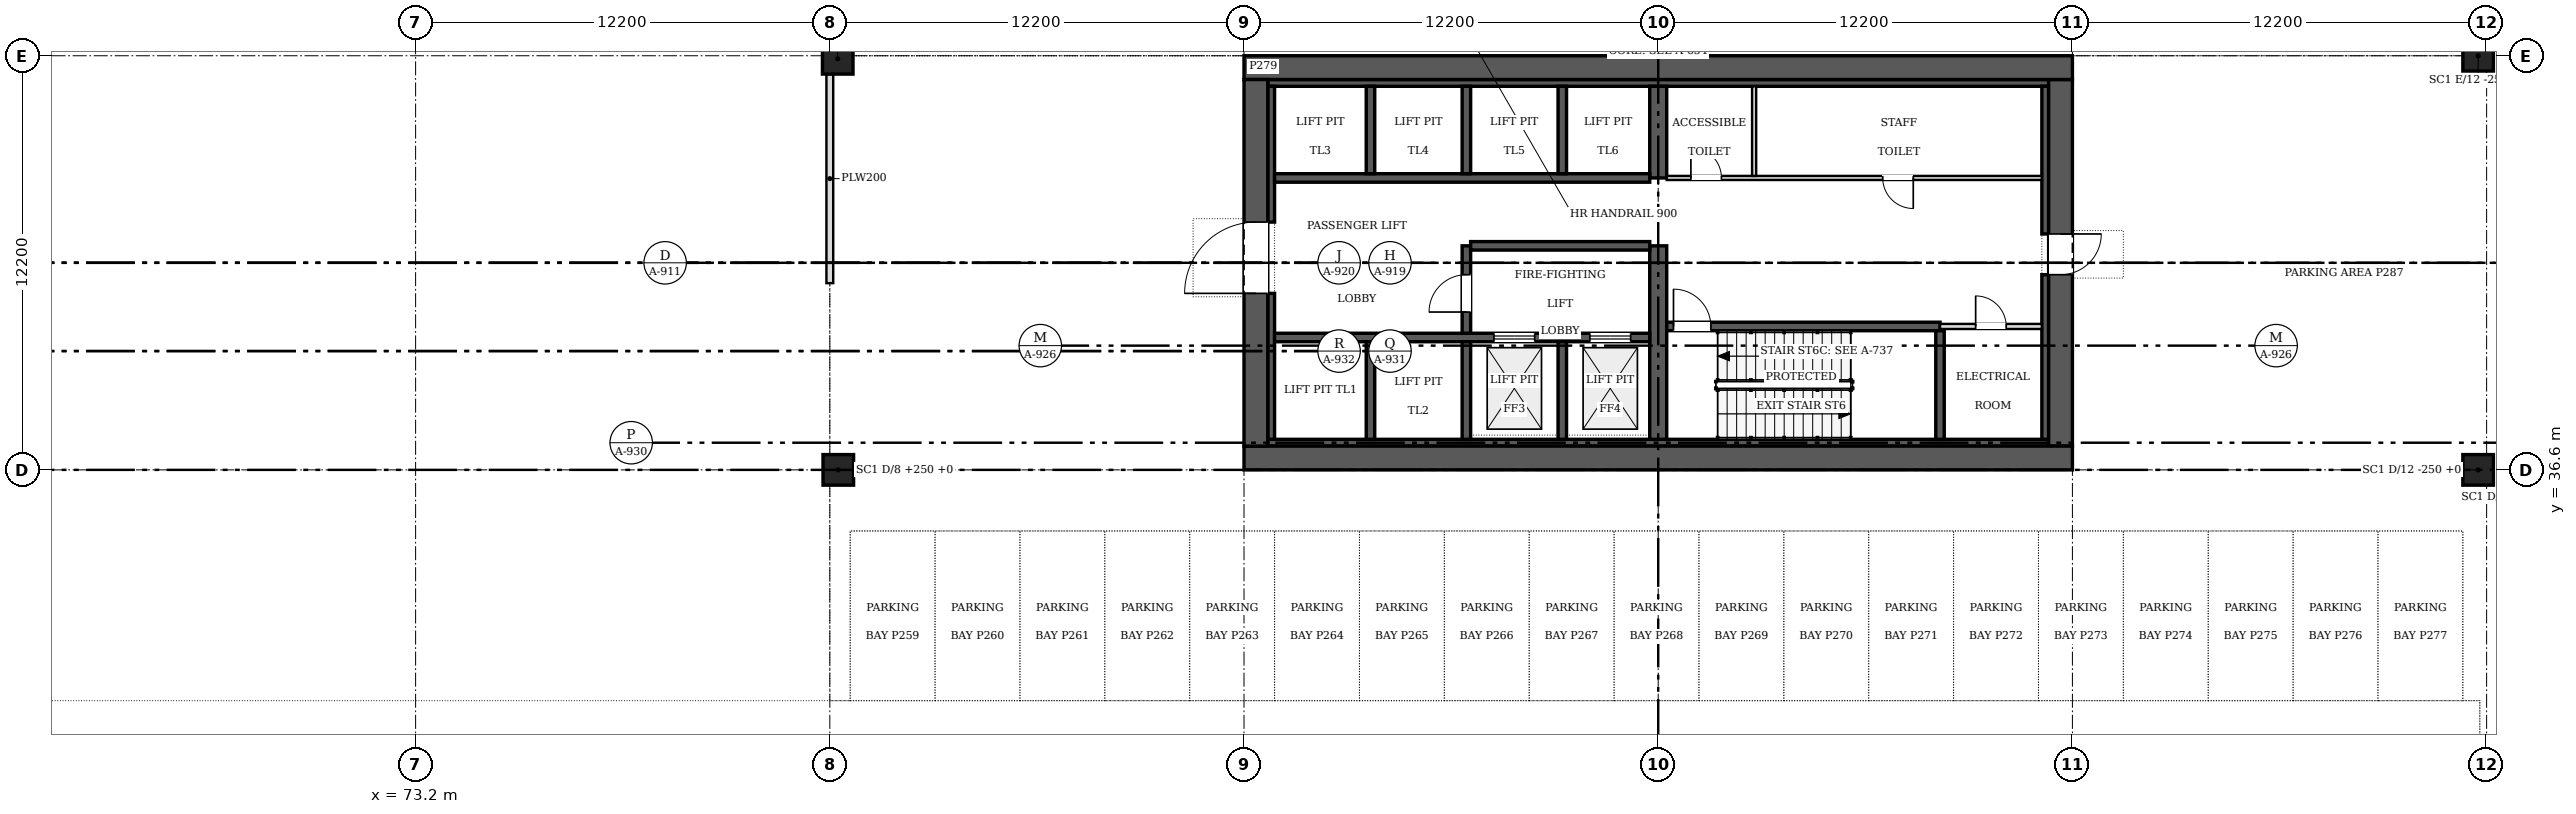
"""IFC4 building model, lengths in metres.
Left out: names, types, materials, properties, quantities, classifications, styles, units other than length and angle.
Written with IfcOpenShell. Run it as: python <this file> out.ifc"""

import sys

from ifc_helpers import new_model, si_unit, direction, frame, frame_2d, origin, origin_2d, place, context, subcontext, project, spatial, rectangle, extrude, source, transform, mapped, element, fill, save


model = new_model("IFC4")
c1 = context("Model", 3, precision=1e-05, world=origin(), true_north=direction((0.0, 1.0)))
c2 = subcontext(c1, "Body", "Model", "MODEL_VIEW")
j1 = project(units=[si_unit("LENGTHUNIT", "METRE"), si_unit("PLANEANGLEUNIT", "RADIAN")], contexts=[c1])
p1 = place(None, origin())
s1 = spatial("IfcSite", under=j1, at=p1, CompositionType="ELEMENT")
p2 = place(p1, origin())
s2 = spatial("IfcBuilding", under=s1, at=p2, CompositionType="ELEMENT")
p3 = place(p2, frame((0.0, 0.0, -5.4)))
s3 = spatial("IfcBuildingStorey", under=s2, at=p3, CompositionType="ELEMENT", Elevation=-5.4)
for number, where, z_axis, x_axis in (
    (1, (133.95, 36.6, 0.0), (0.0, 0.0, 1.0), (1.0, 0.0, 0.0)),
    (2, (133.95, 48.8, 0.0), (0.0, 0.0, 1.0), (1.0, 0.0, 0.0)),
    (3, (85.633, 48.71, 0.0), (0.0, 0.0, 1.0), (1.0, 0.0, 0.0)),
    (4, (85.65, 36.6, 0.0), (0.0, 0.0, 1.0), (1.0, 0.0, 0.0)),
    (5, (73.2, 36.6, 0.0), (0.0, 0.0, 1.0), (1.0, 0.0, 0.0)),
    (6, (73.2, 48.8, 0.0), (0.0, 0.0, 1.0), (1.0, 0.0, 0.0)),
):
    element("IfcColumn", number, at=place(p3, frame(where, z_axis=z_axis, x_axis=x_axis)), inside=s3, PredefinedType="COLUMN", context=c2, shape_type="SweptSolid", body=[
        extrude(rectangle(XDim=0.9, YDim=0.9, at=origin_2d()), origin(), (0.0, 0.0, 1.0), 5.15),
    ])
p4 = place(p3, frame((122.0, 36.95, 0.0), z_axis=(0.0, 0.0, 1.0), x_axis=(-1.0, 0.0, 0.0)))
e7 = element("IfcWall", 7, at=p4, inside=s3, PredefinedType="SHEAR", context=c2, shape_type="SweptSolid", body=[
    extrude(rectangle(XDim=24.4, YDim=0.7, at=frame_2d((12.2, 0.0))), origin(), (0.0, 0.0, 1.0), 5.4),
])
p5 = place(p3, frame((97.95, 37.3, 0.0), z_axis=(0.0, 0.0, 1.0), x_axis=(0.0, 1.0, 0.0)))
e8 = element("IfcWall", 8, at=p5, inside=s3, PredefinedType="SHEAR", context=c2, shape_type="SweptSolid", body=[
    extrude(rectangle(XDim=10.8, YDim=0.7, at=frame_2d((5.4, 0.0))), origin(), (0.0, 0.0, 1.0), 5.4),
])
m1 = source(origin(), c2, "Body", "SweptSolid", [
    extrude(rectangle(XDim=2.1, YDim=2.4, at=frame_2d((1.05, 1.2))), frame((0.0, 0.36, 0.0), z_axis=(0.0, -1.0, 0.0), x_axis=(1.0, 0.0, 0.0)), (0.0, 0.0, 1.0), 0.72),
])
p6 = place(p5, frame((4.5, 0.0, 0.0)))
e9 = element("IfcOpeningElement", 9, at=p6, cuts=e8, PredefinedType="OPENING", context=c2, shape_type="MappedRepresentation", body=[
    mapped(m1, transform((0.0, 0.0, 0.0), scale=1.0)),
])
p7 = place(p3, frame((97.6, 48.45, 0.0), z_axis=(0.0, 0.0, 1.0), x_axis=(1.0, 0.0, 0.0)))
e10 = element("IfcWall", 10, at=p7, inside=s3, PredefinedType="SHEAR", context=c2, shape_type="SweptSolid", body=[
    extrude(rectangle(XDim=24.4, YDim=0.7, at=frame_2d((12.2, 0.0))), origin(), (0.0, 0.0, 1.0), 5.4),
])
p8 = place(p3, frame((121.65, 48.1, 0.0), z_axis=(0.0, 0.0, 1.0), x_axis=(0.0, -1.0, 0.0)))
e11 = element("IfcWall", 11, at=p8, inside=s3, PredefinedType="SHEAR", context=c2, shape_type="SweptSolid", body=[
    extrude(rectangle(XDim=10.8, YDim=0.7, at=frame_2d((5.4, 0.0))), origin(), (0.0, 0.0, 1.0), 5.4),
])
m2 = source(origin(), c2, "Body", "SweptSolid", [
    extrude(rectangle(XDim=1.2, YDim=2.1, at=frame_2d((0.6, 1.05))), frame((0.0, 0.36, 0.0), z_axis=(0.0, -1.0, 0.0), x_axis=(1.0, 0.0, 0.0)), (0.0, 0.0, 1.0), 0.72),
])
p9 = place(p8, frame((4.55, 0.0, 0.0)))
e12 = element("IfcOpeningElement", 12, at=p9, cuts=e11, PredefinedType="OPENING", context=c2, shape_type="MappedRepresentation", body=[
    mapped(m2, transform((0.0, 0.0, 0.0), scale=1.0)),
])
for number, where, z_axis, x_axis in (
    (13, (98.3, 37.4, 0.0), (0.0, 0.0, 1.0), (1.0, 0.0, 0.0)),
    (14, (98.3, 48.0, 0.0), (0.0, 0.0, 1.0), (1.0, 0.0, 0.0)),
):
    element("IfcWall", number, at=place(p3, frame(where, z_axis=z_axis, x_axis=x_axis)), inside=s3, PredefinedType="SOLIDWALL", context=c2, shape_type="SweptSolid", body=[
        extrude(rectangle(XDim=23.0, YDim=0.2, at=frame_2d((11.5, 0.0))), origin(), (0.0, 0.0, 1.0), 5.4),
    ])
p10 = place(p3, frame((98.4, 37.5, 0.0), z_axis=(0.0, 0.0, 1.0), x_axis=(0.0, 1.0, 0.0)))
e15 = element("IfcWall", 15, at=p10, inside=s3, PredefinedType="SOLIDWALL", context=c2, shape_type="SweptSolid", body=[
    extrude(rectangle(XDim=4.3, YDim=0.2, at=frame_2d((2.15, 0.0))), origin(), (0.0, 0.0, 1.0), 5.4),
])
p11 = place(p3, frame((98.4, 43.9, 0.0), z_axis=(0.0, 0.0, 1.0), x_axis=(0.0, 1.0, 0.0)))
e16 = element("IfcWall", 16, at=p11, inside=s3, PredefinedType="SOLIDWALL", context=c2, shape_type="SweptSolid", body=[
    extrude(rectangle(XDim=4.0, YDim=0.2, at=frame_2d((2.0, 0.0))), origin(), (0.0, 0.0, 1.0), 5.4),
])
p12 = place(p3, frame((121.2, 37.5, 0.0), z_axis=(0.0, 0.0, 1.0), x_axis=(0.0, 1.0, 0.0)))
e17 = element("IfcWall", 17, at=p12, inside=s3, PredefinedType="SOLIDWALL", context=c2, shape_type="SweptSolid", body=[
    extrude(rectangle(XDim=4.85, YDim=0.2, at=frame_2d((2.425, 0.0))), origin(), (0.0, 0.0, 1.0), 5.4),
])
p13 = place(p3, frame((121.2, 43.55, 0.0), z_axis=(0.0, 0.0, 1.0), x_axis=(0.0, 1.0, 0.0)))
e18 = element("IfcWall", 18, at=p13, inside=s3, PredefinedType="SOLIDWALL", context=c2, shape_type="SweptSolid", body=[
    extrude(rectangle(XDim=4.35, YDim=0.2, at=frame_2d((2.175, 0.0))), origin(), (0.0, 0.0, 1.0), 5.4),
])
p14 = place(p3, frame((109.8, 37.5, 0.0), z_axis=(0.0, 0.0, 1.0), x_axis=(0.0, 1.0, 0.0)))
e19 = element("IfcWall", 19, at=p14, inside=s3, PredefinedType="SHEAR", context=c2, shape_type="SweptSolid", body=[
    extrude(rectangle(XDim=5.7, YDim=0.5, at=frame_2d((2.85, 0.0))), origin(), (0.0, 0.0, 1.0), 5.4),
])
p15 = place(p3, frame((109.8, 45.2, 0.0), z_axis=(0.0, 0.0, 1.0), x_axis=(0.0, 1.0, 0.0)))
e20 = element("IfcWall", 20, at=p15, inside=s3, PredefinedType="SHEAR", context=c2, shape_type="SweptSolid", body=[
    extrude(rectangle(XDim=2.7, YDim=0.5, at=frame_2d((1.35, 0.0))), origin(), (0.0, 0.0, 1.0), 5.4),
])
p16 = place(p3, frame((98.5, 40.5, 0.0), z_axis=(0.0, 0.0, 1.0), x_axis=(1.0, 0.0, 0.0)))
e21 = element("IfcWall", 21, at=p16, inside=s3, PredefinedType="SOLIDWALL", context=c2, shape_type="SweptSolid", body=[
    extrude(rectangle(XDim=11.05, YDim=0.25, at=frame_2d((5.525, 0.0))), origin(), (0.0, 0.0, 1.0), 5.4),
])
m3 = source(origin(), c2, "Body", "SweptSolid", [
    extrude(rectangle(XDim=1.2, YDim=2.1, at=frame_2d((0.6, 1.05))), frame((0.0, 0.135, 0.0), z_axis=(0.0, -1.0, 0.0), x_axis=(1.0, 0.0, 0.0)), (0.0, 0.0, 1.0), 0.27),
])
p17 = place(p16, frame((6.462, 0.0, 0.0)))
e22 = element("IfcOpeningElement", 22, at=p17, cuts=e21, PredefinedType="OPENING", context=c2, shape_type="MappedRepresentation", body=[
    mapped(m3, transform((0.0, 0.0, 0.0), scale=1.0)),
])
p18 = place(p16, frame((9.288, 0.0, 0.0)))
e23 = element("IfcOpeningElement", 23, at=p18, cuts=e21, PredefinedType="OPENING", context=c2, shape_type="MappedRepresentation", body=[
    mapped(m3, transform((0.0, 0.0, 0.0), scale=1.0)),
])
p19 = place(p3, frame((98.5, 45.2, 0.0), z_axis=(0.0, 0.0, 1.0), x_axis=(1.0, 0.0, 0.0)))
e24 = element("IfcWall", 24, at=p19, inside=s3, PredefinedType="SOLIDWALL", context=c2, shape_type="SweptSolid", body=[
    extrude(rectangle(XDim=11.05, YDim=0.25, at=frame_2d((5.525, 0.0))), origin(), (0.0, 0.0, 1.0), 5.4),
])
p20 = place(p3, frame((118.1, 40.825, 0.0), z_axis=(0.0, 0.0, 1.0), x_axis=(-1.0, 0.0, 0.0)))
e25 = element("IfcWall", 25, at=p20, inside=s3, PredefinedType="SOLIDWALL", context=c2, shape_type="SweptSolid", body=[
    extrude(rectangle(XDim=8.05, YDim=0.25, at=frame_2d((4.025, 0.0))), origin(), (0.0, 0.0, 1.0), 5.4),
])
m4 = source(origin(), c2, "Body", "SweptSolid", [
    extrude(rectangle(XDim=1.1, YDim=2.1, at=frame_2d((0.55, 1.05))), frame((0.0, 0.135, 0.0), z_axis=(0.0, -1.0, 0.0), x_axis=(1.0, 0.0, 0.0)), (0.0, 0.0, 1.0), 0.27),
])
p21 = place(p20, frame((6.75, 0.0, 0.0)))
e26 = element("IfcOpeningElement", 26, at=p21, cuts=e25, PredefinedType="OPENING", context=c2, shape_type="MappedRepresentation", body=[
    mapped(m4, transform((0.0, 0.0, 0.0), scale=1.0)),
])
p22 = place(p3, frame((104.15, 37.5, 0.0), z_axis=(0.0, 0.0, 1.0), x_axis=(0.0, 1.0, 0.0)))
e27 = element("IfcWall", 27, at=p22, inside=s3, PredefinedType="SOLIDWALL", context=c2, shape_type="SweptSolid", body=[
    extrude(rectangle(XDim=2.875, YDim=0.25, at=frame_2d((1.438, 0.0))), origin(), (0.0, 0.0, 1.0), 5.4),
])
p23 = place(p3, frame((104.15, 43.2, 0.0), z_axis=(0.0, 0.0, 1.0), x_axis=(0.0, -1.0, 0.0)))
e28 = element("IfcWall", 28, at=p23, inside=s3, PredefinedType="SOLIDWALL", context=c2, shape_type="SweptSolid", body=[
    extrude(rectangle(XDim=2.575, YDim=0.25, at=frame_2d((1.288, 0.0))), origin(), (0.0, 0.0, 1.0), 5.4),
])
p24 = place(p23, frame((0.85, 0.0, 0.0)))
e29 = element("IfcOpeningElement", 29, at=p24, cuts=e28, PredefinedType="OPENING", context=c2, shape_type="MappedRepresentation", body=[
    mapped(m4, transform((0.0, 0.0, 0.0), scale=1.0)),
])
p25 = place(p3, frame((104.275, 43.2, 0.0), z_axis=(0.0, 0.0, 1.0), x_axis=(1.0, 0.0, 0.0)))
e30 = element("IfcWall", 30, at=p25, inside=s3, PredefinedType="SOLIDWALL", context=c2, shape_type="SweptSolid", body=[
    extrude(rectangle(XDim=5.275, YDim=0.25, at=frame_2d((2.638, 0.0))), origin(), (0.0, 0.0, 1.0), 5.4),
])
p26 = place(p3, frame((118.1, 37.5, 0.0), z_axis=(0.0, 0.0, 1.0), x_axis=(0.0, 1.0, 0.0)))
e31 = element("IfcWall", 31, at=p26, inside=s3, PredefinedType="SOLIDWALL", context=c2, shape_type="SweptSolid", body=[
    extrude(rectangle(XDim=3.2, YDim=0.25, at=frame_2d((1.6, 0.0))), origin(), (0.0, 0.0, 1.0), 5.4),
])
for number, where, z_axis, x_axis in (
    (32, (101.325, 37.5, 0.0), (0.0, 0.0, 1.0), (0.0, 1.0, 0.0)),
    (33, (106.975, 37.5, 0.0), (0.0, 0.0, 1.0), (0.0, 1.0, 0.0)),
):
    element("IfcWall", number, at=place(p3, frame(where, z_axis=z_axis, x_axis=x_axis)), inside=s3, PredefinedType="SOLIDWALL", context=c2, shape_type="SweptSolid", body=[
        extrude(rectangle(XDim=2.875, YDim=0.25, at=frame_2d((1.438, 0.0))), origin(), (0.0, 0.0, 1.0), 5.4),
    ])
for number, where, z_axis, x_axis in (
    (34, (101.325, 45.325, 0.0), (0.0, 0.0, 1.0), (0.0, 1.0, 0.0)),
    (35, (104.15, 45.325, 0.0), (0.0, 0.0, 1.0), (0.0, 1.0, 0.0)),
    (36, (106.975, 45.325, 0.0), (0.0, 0.0, 1.0), (0.0, 1.0, 0.0)),
):
    element("IfcWall", number, at=place(p3, frame(where, z_axis=z_axis, x_axis=x_axis)), inside=s3, PredefinedType="SOLIDWALL", context=c2, shape_type="SweptSolid", body=[
        extrude(rectangle(XDim=2.575, YDim=0.25, at=frame_2d((1.288, 0.0))), origin(), (0.0, 0.0, 1.0), 5.4),
    ])
p27 = place(p3, frame((110.05, 45.2, 0.0), z_axis=(0.0, 0.0, 1.0), x_axis=(1.0, 0.0, 0.0)))
e37 = element("IfcWall", 37, at=p27, inside=s3, PredefinedType="PARTITIONING", context=c2, shape_type="SweptSolid", body=[
    extrude(rectangle(XDim=11.05, YDim=0.12, at=frame_2d((5.525, 0.0))), origin(), (0.0, 0.0, 1.0), 5.15),
])
m5 = source(origin(), c2, "Body", "SweptSolid", [
    extrude(rectangle(XDim=0.9, YDim=2.1, at=frame_2d((0.45, 1.05))), frame((0.0, 0.07, 0.0), z_axis=(0.0, -1.0, 0.0), x_axis=(1.0, 0.0, 0.0)), (0.0, 0.0, 1.0), 0.14),
])
p28 = place(p27, frame((0.712, 0.0, 0.0)))
e38 = element("IfcOpeningElement", 38, at=p28, cuts=e37, PredefinedType="OPENING", context=c2, shape_type="MappedRepresentation", body=[
    mapped(m5, transform((0.0, 0.0, 0.0), scale=1.0)),
])
p29 = place(p27, frame((6.363, 0.0, 0.0)))
e39 = element("IfcOpeningElement", 39, at=p29, cuts=e37, PredefinedType="OPENING", context=c2, shape_type="MappedRepresentation", body=[
    mapped(m5, transform((0.0, 0.0, 0.0), scale=1.0)),
])
p30 = place(p3, frame((121.1, 40.825, 0.0), z_axis=(0.0, 0.0, 1.0), x_axis=(-1.0, 0.0, 0.0)))
e40 = element("IfcWall", 40, at=p30, inside=s3, PredefinedType="PARTITIONING", context=c2, shape_type="SweptSolid", body=[
    extrude(rectangle(XDim=3.0, YDim=0.15, at=frame_2d((1.5, 0.0))), origin(), (0.0, 0.0, 1.0), 5.15),
])
m6 = source(origin(), c2, "Body", "SweptSolid", [
    extrude(rectangle(XDim=0.9, YDim=2.1, at=frame_2d((0.45, 1.05))), frame((0.0, 0.085, 0.0), z_axis=(0.0, -1.0, 0.0), x_axis=(1.0, 0.0, 0.0)), (0.0, 0.0, 1.0), 0.17),
])
p31 = place(p30, frame((1.05, 0.0, 0.0)))
e41 = element("IfcOpeningElement", 41, at=p31, cuts=e40, PredefinedType="OPENING", context=c2, shape_type="MappedRepresentation", body=[
    mapped(m6, transform((0.0, 0.0, 0.0), scale=1.0)),
])
p32 = place(p3, frame((112.625, 45.26, 0.0), z_axis=(0.0, 0.0, 1.0), x_axis=(0.0, 1.0, 0.0)))
e42 = element("IfcWall", 42, at=p32, inside=s3, PredefinedType="PARTITIONING", context=c2, shape_type="SweptSolid", body=[
    extrude(rectangle(XDim=2.64, YDim=0.12, at=frame_2d((1.32, 0.0))), origin(), (0.0, 0.0, 1.0), 5.15),
])
p33 = place(p3, frame((61.0, 42.0, 0.0), z_axis=(0.0, 0.0, 1.0), x_axis=(1.0, 0.0, 0.0)))
e43 = element("IfcWall", 43, at=p33, inside=s3, PredefinedType="PARTITIONING", context=c2, shape_type="SweptSolid", body=[
    extrude(rectangle(XDim=24.4, YDim=0.2, at=frame_2d((12.2, 0.0))), origin(), (0.0, 0.0, 1.0), 4.315),
])
m7 = source(origin(), c2, "Body", "SweptSolid", [
    extrude(rectangle(XDim=1.5, YDim=2.1, at=frame_2d((0.75, 1.05))), frame((0.0, 0.11, 0.0), z_axis=(0.0, -1.0, 0.0), x_axis=(1.0, 0.0, 0.0)), (0.0, 0.0, 1.0), 0.22),
])
p34 = place(p33, frame((11.4, 0.0, 0.0)))
e44 = element("IfcOpeningElement", 44, at=p34, cuts=e43, PredefinedType="OPENING", context=c2, shape_type="MappedRepresentation", body=[
    mapped(m7, transform((0.0, 0.0, 0.0), scale=1.0)),
])
p35 = place(p3, frame((85.4, 42.101, 0.0), z_axis=(0.0, 0.0, 1.0), x_axis=(0.0, 1.0, 0.0)))
e45 = element("IfcWall", 45, at=p35, inside=s3, PredefinedType="PARTITIONING", context=c2, shape_type="SweptSolid", body=[
    extrude(rectangle(XDim=6.158, YDim=0.2, at=frame_2d((3.079, 0.0))), origin(), (0.0, 0.0, 1.0), 4.315),
])
p36 = place(p3, frame((61.201, 48.8, 0.0), z_axis=(0.0, 0.0, 1.0), x_axis=(1.0, 0.0, 0.0)))
e46 = element("IfcWall", 46, at=p36, inside=s3, PredefinedType="PARTITIONING", context=c2, shape_type="SweptSolid", body=[
    extrude(rectangle(XDim=11.548, YDim=0.2, at=frame_2d((5.774, 0.0))), origin(), (0.0, 0.0, 1.0), 4.315),
])
p37 = place(p3, frame((73.651, 48.8, 0.0), z_axis=(0.0, 0.0, 1.0), x_axis=(1.0, 0.0, 0.0)))
e47 = element("IfcWall", 47, at=p37, inside=s3, PredefinedType="PARTITIONING", context=c2, shape_type="SweptSolid", body=[
    extrude(rectangle(XDim=11.531, YDim=0.2, at=frame_2d((5.766, 0.0))), origin(), (0.0, 0.0, 1.0), 4.315),
])
m8 = source(origin(), c2, "Body", "SweptSolid", [
    extrude(rectangle(XDim=2.1, YDim=2.4, at=frame_2d((1.05, 1.2))), frame((0.0, 0.025, 0.0), z_axis=(0.0, -1.0, 0.0), x_axis=(1.0, 0.0, 0.0)), (0.0, 0.0, 1.0), 0.05),
])
p38 = place(p6, origin())
e48 = element("IfcDoor", 48, at=p38, inside=s3, OperationType="DOUBLE_DOOR_SINGLE_SWING", PredefinedType="DOOR", context=c2, shape_type="MappedRepresentation", body=[
    mapped(m8, transform((0.0, 0.0, 0.0), scale=1.0)),
])
fill(e9, e48)
m9 = source(origin(), c2, "Body", "SweptSolid", [
    extrude(rectangle(XDim=1.2, YDim=2.1, at=frame_2d((0.6, 1.05))), frame((0.0, 0.025, 0.0), z_axis=(0.0, -1.0, 0.0), x_axis=(1.0, 0.0, 0.0)), (0.0, 0.0, 1.0), 0.05),
])
p39 = place(p9, origin())
e49 = element("IfcDoor", 49, at=p39, inside=s3, OperationType="SINGLE_SWING_LEFT", PredefinedType="DOOR", context=c2, shape_type="MappedRepresentation", body=[
    mapped(m9, transform((0.0, 0.0, 0.0), scale=1.0)),
])
fill(e12, e49)
p40 = place(p17, origin())
e50 = element("IfcDoor", 50, at=p40, inside=s3, OperationType="DOUBLE_DOOR_SLIDING", PredefinedType="DOOR", context=c2, shape_type="MappedRepresentation", body=[
    mapped(m9, transform((0.0, 0.0, 0.0), scale=1.0)),
])
fill(e22, e50)
p41 = place(p18, origin())
e51 = element("IfcDoor", 51, at=p41, inside=s3, OperationType="DOUBLE_DOOR_SLIDING", PredefinedType="DOOR", context=c2, shape_type="MappedRepresentation", body=[
    mapped(m9, transform((0.0, 0.0, 0.0), scale=1.0)),
])
fill(e23, e51)
m10 = source(origin(), c2, "Body", "SweptSolid", [
    extrude(rectangle(XDim=1.1, YDim=2.1, at=frame_2d((0.55, 1.05))), frame((0.0, 0.025, 0.0), z_axis=(0.0, -1.0, 0.0), x_axis=(1.0, 0.0, 0.0)), (0.0, 0.0, 1.0), 0.05),
])
p42 = place(p21, origin())
e52 = element("IfcDoor", 52, at=p42, inside=s3, OperationType="SINGLE_SWING_RIGHT", PredefinedType="DOOR", context=c2, shape_type="MappedRepresentation", body=[
    mapped(m10, transform((0.0, 0.0, 0.0), scale=1.0)),
])
fill(e26, e52)
p43 = place(p24, origin())
e53 = element("IfcDoor", 53, at=p43, inside=s3, OperationType="SINGLE_SWING_RIGHT", PredefinedType="DOOR", context=c2, shape_type="MappedRepresentation", body=[
    mapped(m10, transform((0.0, 0.0, 0.0), scale=1.0)),
])
fill(e29, e53)
m11 = source(origin(), c2, "Body", "SweptSolid", [
    extrude(rectangle(XDim=0.9, YDim=2.1, at=frame_2d((0.45, 1.05))), frame((0.0, 0.025, 0.0), z_axis=(0.0, -1.0, 0.0), x_axis=(1.0, 0.0, 0.0)), (0.0, 0.0, 1.0), 0.05),
])
p44 = place(p28, origin())
e54 = element("IfcDoor", 54, at=p44, inside=s3, OperationType="SINGLE_SWING_LEFT", PredefinedType="DOOR", context=c2, shape_type="MappedRepresentation", body=[
    mapped(m11, transform((0.0, 0.0, 0.0), scale=1.0)),
])
fill(e38, e54)
p45 = place(p29, origin())
e55 = element("IfcDoor", 55, at=p45, inside=s3, OperationType="SINGLE_SWING_RIGHT", PredefinedType="DOOR", context=c2, shape_type="MappedRepresentation", body=[
    mapped(m11, transform((0.0, 0.0, 0.0), scale=1.0)),
])
fill(e39, e55)
p46 = place(p31, origin())
e56 = element("IfcDoor", 56, at=p46, inside=s3, OperationType="SINGLE_SWING_RIGHT", PredefinedType="DOOR", context=c2, shape_type="MappedRepresentation", body=[
    mapped(m11, transform((0.0, 0.0, 0.0), scale=1.0)),
])
fill(e41, e56)
m12 = source(origin(), c2, "Body", "SweptSolid", [
    extrude(rectangle(XDim=1.5, YDim=2.1, at=frame_2d((0.75, 1.05))), frame((0.0, 0.025, 0.0), z_axis=(0.0, -1.0, 0.0), x_axis=(1.0, 0.0, 0.0)), (0.0, 0.0, 1.0), 0.05),
])
p47 = place(p34, origin())
e57 = element("IfcDoor", 57, at=p47, inside=s3, OperationType="SINGLE_SWING_LEFT", PredefinedType="DOOR", context=c2, shape_type="MappedRepresentation", body=[
    mapped(m12, transform((0.0, 0.0, 0.0), scale=1.0)),
])
fill(e44, e57)
save(model, sys.argv[1])
